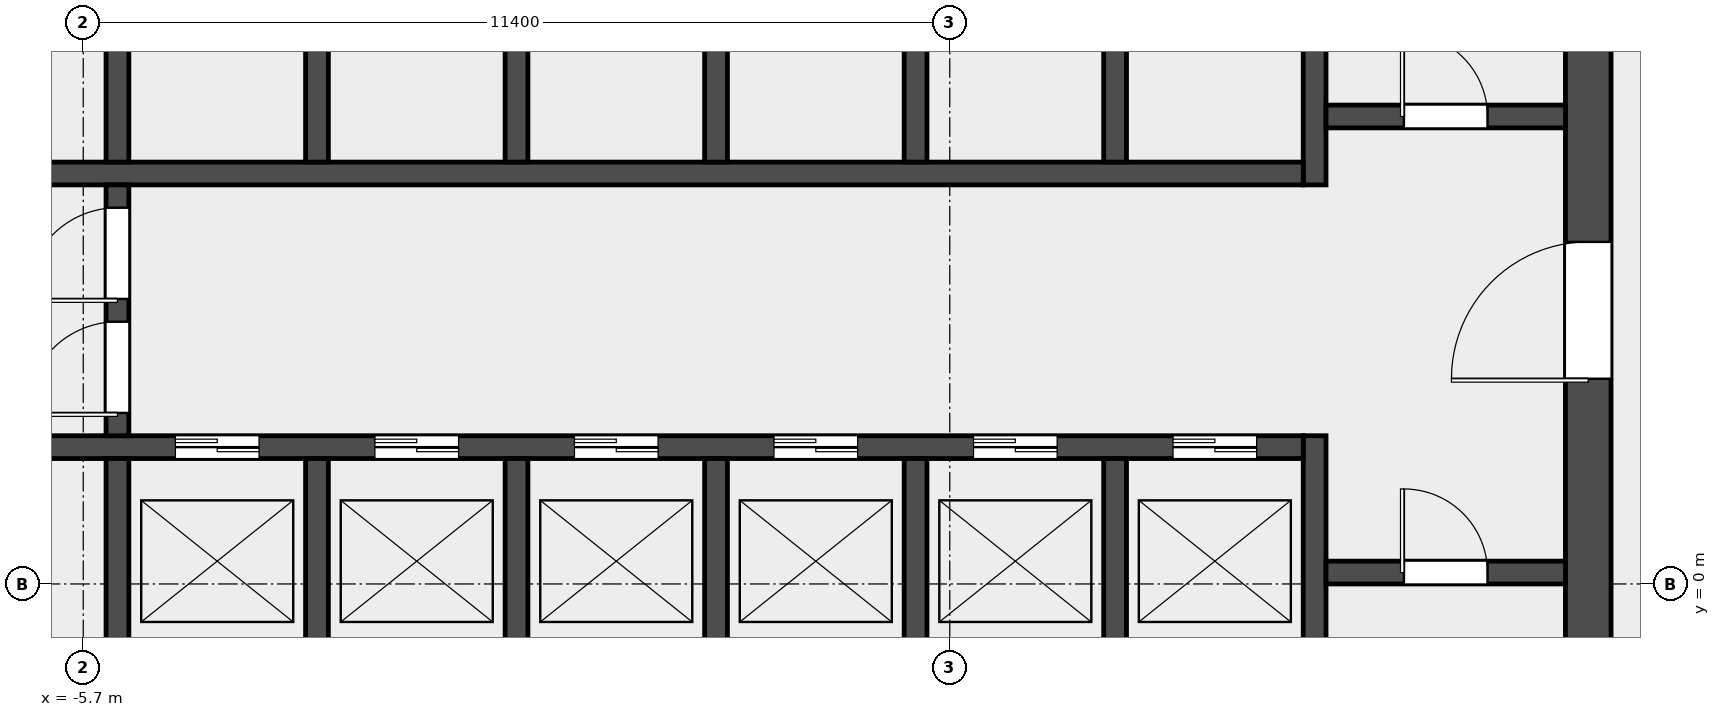
"""IFC4 building model, lengths in metres.
Left out: names, types, materials, properties, quantities, classifications, styles, units other than length and angle.
Written with IfcOpenShell. Run it as: python <this file> out.ifc"""

import sys

from ifc_helpers import new_model, si_unit, direction, frame, frame_2d, origin, place, context, subcontext, project, spatial, rectangle, extrude, element, fill, save


model = new_model("IFC4")
c1 = context("Model", 3, precision=1e-05, world=origin(), true_north=direction((0.0, 1.0)))
c2 = subcontext(c1, "Body", "Model", "MODEL_VIEW")
j1 = project(units=[si_unit("LENGTHUNIT", "METRE"), si_unit("PLANEANGLEUNIT", "RADIAN")], contexts=[c1])
p1 = place(None, origin())
s1 = spatial("IfcSite", under=j1, at=p1, CompositionType="ELEMENT")
p2 = place(p1, origin())
s2 = spatial("IfcBuilding", under=s1, at=p2, CompositionType="ELEMENT")
p3 = place(p2, frame((0.0, 0.0, 197.0)))
s3 = spatial("IfcBuildingStorey", under=s2, at=p3, CompositionType="ELEMENT", Elevation=197.0)
p4 = place(p3, frame((14.1, -6.6, 0.0), z_axis=(0.0, 0.0, 1.0), x_axis=(0.0, 1.0, 0.0)))
e1 = element("IfcWall", 1, at=p4, inside=s3, PredefinedType="SHEAR", context=c2, shape_type="SweptSolid", body=[
    extrude(rectangle(XDim=19.5, YDim=0.6, at=frame_2d((9.75, 0.0))), origin(), (0.0, 0.0, 1.0), 3.7),
])
p5 = place(p4, frame((9.3, 0.0, 0.0)))
e2 = element("IfcOpeningElement", 2, at=p5, cuts=e1, PredefinedType="OPENING", context=c2, shape_type="SweptSolid", body=[
    extrude(rectangle(XDim=1.8, YDim=2.1, at=frame_2d((0.9, 1.05))), frame((0.0, 0.312, 0.0), z_axis=(0.0, -1.0, 0.0), x_axis=(1.0, 0.0, 0.0)), (0.0, 0.0, 1.0), 0.624),
])
p6 = place(p3, frame((10.5, -6.6, 0.0), z_axis=(0.0, 0.0, 1.0), x_axis=(0.0, 1.0, 0.0)))
e3 = element("IfcWall", 3, at=p6, inside=s3, PredefinedType="SHEAR", context=c2, shape_type="SweptSolid", body=[
    extrude(rectangle(XDim=8.55, YDim=0.3, at=frame_2d((4.275, 0.0))), origin(), (0.0, 0.0, 1.0), 3.7),
])
p7 = place(p3, frame((10.5, 5.25, 0.0), z_axis=(0.0, 0.0, 1.0), x_axis=(0.0, 1.0, 0.0)))
e4 = element("IfcWall", 4, at=p7, inside=s3, PredefinedType="SHEAR", context=c2, shape_type="SweptSolid", body=[
    extrude(rectangle(XDim=7.65, YDim=0.3, at=frame_2d((3.825, 0.0))), origin(), (0.0, 0.0, 1.0), 3.7),
])
p8 = place(p3, frame((10.65, 0.15, 0.0), z_axis=(0.0, 0.0, 1.0), x_axis=(1.0, 0.0, 0.0)))
e5 = element("IfcWall", 5, at=p8, inside=s3, PredefinedType="SOLIDWALL", context=c2, shape_type="SweptSolid", body=[
    extrude(rectangle(XDim=3.15, YDim=0.3, at=frame_2d((1.575, 0.0))), origin(), (0.0, 0.0, 1.0), 3.7),
])
p9 = place(p8, frame((1.025, 0.0, 0.0)))
e6 = element("IfcOpeningElement", 6, at=p9, cuts=e5, PredefinedType="OPENING", context=c2, shape_type="SweptSolid", body=[
    extrude(rectangle(XDim=1.1, YDim=2.1, at=frame_2d((0.55, 1.05))), frame((0.0, 0.162, 0.0), z_axis=(0.0, -1.0, 0.0), x_axis=(1.0, 0.0, 0.0)), (0.0, 0.0, 1.0), 0.324),
])
p10 = place(p3, frame((10.65, 6.15, 0.0), z_axis=(0.0, 0.0, 1.0), x_axis=(1.0, 0.0, 0.0)))
e7 = element("IfcWall", 7, at=p10, inside=s3, PredefinedType="SOLIDWALL", context=c2, shape_type="SweptSolid", body=[
    extrude(rectangle(XDim=3.15, YDim=0.3, at=frame_2d((1.575, 0.0))), origin(), (0.0, 0.0, 1.0), 3.7),
])
p11 = place(p10, frame((1.025, 0.0, 0.0)))
e8 = element("IfcOpeningElement", 8, at=p11, cuts=e7, PredefinedType="OPENING", context=c2, shape_type="SweptSolid", body=[
    extrude(rectangle(XDim=1.1, YDim=2.1, at=frame_2d((0.55, 1.05))), frame((0.0, 0.162, 0.0), z_axis=(0.0, -1.0, 0.0), x_axis=(1.0, 0.0, 0.0)), (0.0, 0.0, 1.0), 0.324),
])
p12 = place(p3, frame((-10.35, 1.8, 0.0), z_axis=(0.0, 0.0, 1.0), x_axis=(1.0, 0.0, 0.0)))
e9 = element("IfcWall", 9, at=p12, inside=s3, PredefinedType="SOLIDWALL", context=c2, shape_type="SweptSolid", body=[
    extrude(rectangle(XDim=20.7, YDim=0.3, at=frame_2d((10.35, 0.0))), origin(), (0.0, 0.0, 1.0), 3.7),
])
p13 = place(p12, frame((0.512, 0.0, 0.0)))
e10 = element("IfcOpeningElement", 10, at=p13, cuts=e9, PredefinedType="OPENING", context=c2, shape_type="SweptSolid", body=[
    extrude(rectangle(XDim=1.3, YDim=2.1, at=frame_2d((0.65, 1.05))), frame((0.0, 0.162, 0.0), z_axis=(0.0, -1.0, 0.0), x_axis=(1.0, 0.0, 0.0)), (0.0, 0.0, 1.0), 0.324),
])
p14 = place(p12, frame((5.863, 0.0, 0.0)))
e11 = element("IfcOpeningElement", 11, at=p14, cuts=e9, PredefinedType="OPENING", context=c2, shape_type="SweptSolid", body=[
    extrude(rectangle(XDim=1.1, YDim=2.1, at=frame_2d((0.55, 1.05))), frame((0.0, 0.162, 0.0), z_axis=(0.0, -1.0, 0.0), x_axis=(1.0, 0.0, 0.0)), (0.0, 0.0, 1.0), 0.324),
])
p15 = place(p12, frame((8.488, 0.0, 0.0)))
e12 = element("IfcOpeningElement", 12, at=p15, cuts=e9, PredefinedType="OPENING", context=c2, shape_type="SweptSolid", body=[
    extrude(rectangle(XDim=1.1, YDim=2.1, at=frame_2d((0.55, 1.05))), frame((0.0, 0.162, 0.0), z_axis=(0.0, -1.0, 0.0), x_axis=(1.0, 0.0, 0.0)), (0.0, 0.0, 1.0), 0.324),
])
p16 = place(p12, frame((11.113, 0.0, 0.0)))
e13 = element("IfcOpeningElement", 13, at=p16, cuts=e9, PredefinedType="OPENING", context=c2, shape_type="SweptSolid", body=[
    extrude(rectangle(XDim=1.1, YDim=2.1, at=frame_2d((0.55, 1.05))), frame((0.0, 0.162, 0.0), z_axis=(0.0, -1.0, 0.0), x_axis=(1.0, 0.0, 0.0)), (0.0, 0.0, 1.0), 0.324),
])
p17 = place(p12, frame((13.738, 0.0, 0.0)))
e14 = element("IfcOpeningElement", 14, at=p17, cuts=e9, PredefinedType="OPENING", context=c2, shape_type="SweptSolid", body=[
    extrude(rectangle(XDim=1.1, YDim=2.1, at=frame_2d((0.55, 1.05))), frame((0.0, 0.162, 0.0), z_axis=(0.0, -1.0, 0.0), x_axis=(1.0, 0.0, 0.0)), (0.0, 0.0, 1.0), 0.324),
])
p18 = place(p12, frame((16.363, 0.0, 0.0)))
e15 = element("IfcOpeningElement", 15, at=p18, cuts=e9, PredefinedType="OPENING", context=c2, shape_type="SweptSolid", body=[
    extrude(rectangle(XDim=1.1, YDim=2.1, at=frame_2d((0.55, 1.05))), frame((0.0, 0.162, 0.0), z_axis=(0.0, -1.0, 0.0), x_axis=(1.0, 0.0, 0.0)), (0.0, 0.0, 1.0), 0.324),
])
p19 = place(p12, frame((18.988, 0.0, 0.0)))
e16 = element("IfcOpeningElement", 16, at=p19, cuts=e9, PredefinedType="OPENING", context=c2, shape_type="SweptSolid", body=[
    extrude(rectangle(XDim=1.1, YDim=2.1, at=frame_2d((0.55, 1.05))), frame((0.0, 0.162, 0.0), z_axis=(0.0, -1.0, 0.0), x_axis=(1.0, 0.0, 0.0)), (0.0, 0.0, 1.0), 0.324),
])
p20 = place(p3, frame((-10.35, 5.4, 0.0), z_axis=(0.0, 0.0, 1.0), x_axis=(1.0, 0.0, 0.0)))
e17 = element("IfcWall", 17, at=p20, inside=s3, PredefinedType="SOLIDWALL", context=c2, shape_type="SweptSolid", body=[
    extrude(rectangle(XDim=20.7, YDim=0.3, at=frame_2d((10.35, 0.0))), origin(), (0.0, 0.0, 1.0), 3.7),
])
p21 = place(p20, frame((0.512, 0.0, 0.0)))
e18 = element("IfcOpeningElement", 18, at=p21, cuts=e17, PredefinedType="OPENING", context=c2, shape_type="SweptSolid", body=[
    extrude(rectangle(XDim=1.3, YDim=2.1, at=frame_2d((0.65, 1.05))), frame((0.0, 0.162, 0.0), z_axis=(0.0, -1.0, 0.0), x_axis=(1.0, 0.0, 0.0)), (0.0, 0.0, 1.0), 0.324),
])
for number, where, z_axis, x_axis in (
    (19, (-5.25, -1.05, 0.0), (0.0, 0.0, 1.0), (0.0, 1.0, 0.0)),
    (20, (-2.625, -1.05, 0.0), (0.0, 0.0, 1.0), (0.0, 1.0, 0.0)),
    (21, (0.0, -1.05, 0.0), (0.0, 0.0, 1.0), (0.0, 1.0, 0.0)),
    (22, (2.625, -1.05, 0.0), (0.0, 0.0, 1.0), (0.0, 1.0, 0.0)),
    (23, (5.25, -1.05, 0.0), (0.0, 0.0, 1.0), (0.0, 1.0, 0.0)),
    (24, (7.875, -1.05, 0.0), (0.0, 0.0, 1.0), (0.0, 1.0, 0.0)),
    (25, (-5.25, 5.55, 0.0), (0.0, 0.0, 1.0), (0.0, 1.0, 0.0)),
    (26, (-2.625, 5.55, 0.0), (0.0, 0.0, 1.0), (0.0, 1.0, 0.0)),
    (27, (0.0, 5.55, 0.0), (0.0, 0.0, 1.0), (0.0, 1.0, 0.0)),
    (28, (2.625, 5.55, 0.0), (0.0, 0.0, 1.0), (0.0, 1.0, 0.0)),
    (29, (5.25, 5.55, 0.0), (0.0, 0.0, 1.0), (0.0, 1.0, 0.0)),
    (30, (7.875, 5.55, 0.0), (0.0, 0.0, 1.0), (0.0, 1.0, 0.0)),
):
    element("IfcWall", number, at=place(p3, frame(where, z_axis=z_axis, x_axis=x_axis)), inside=s3, PredefinedType="SOLIDWALL", context=c2, shape_type="SweptSolid", body=[
        extrude(rectangle(XDim=2.7, YDim=0.3, at=frame_2d((1.35, 0.0))), origin(), (0.0, 0.0, 1.0), 3.7),
    ])
p22 = place(p3, frame((-5.25, 1.95, 0.0), z_axis=(0.0, 0.0, 1.0), x_axis=(0.0, 1.0, 0.0)))
e31 = element("IfcWall", 31, at=p22, inside=s3, PredefinedType="SOLIDWALL", context=c2, shape_type="SweptSolid", body=[
    extrude(rectangle(XDim=3.3, YDim=0.3, at=frame_2d((1.65, 0.0))), origin(), (0.0, 0.0, 1.0), 3.7),
])
p23 = place(p22, frame((0.3, 0.0, 0.0)))
e32 = element("IfcOpeningElement", 32, at=p23, cuts=e31, PredefinedType="OPENING", context=c2, shape_type="SweptSolid", body=[
    extrude(rectangle(XDim=1.2, YDim=2.1, at=frame_2d((0.6, 1.05))), frame((0.0, 0.162, 0.0), z_axis=(0.0, -1.0, 0.0), x_axis=(1.0, 0.0, 0.0)), (0.0, 0.0, 1.0), 0.324),
])
p24 = place(p22, frame((1.8, 0.0, 0.0)))
e33 = element("IfcOpeningElement", 33, at=p24, cuts=e31, PredefinedType="OPENING", context=c2, shape_type="SweptSolid", body=[
    extrude(rectangle(XDim=1.2, YDim=2.1, at=frame_2d((0.6, 1.05))), frame((0.0, 0.162, 0.0), z_axis=(0.0, -1.0, 0.0), x_axis=(1.0, 0.0, 0.0)), (0.0, 0.0, 1.0), 0.324),
])
p25 = place(p9, origin())
e34 = element("IfcDoor", 34, at=p25, inside=s3, OperationType="SINGLE_SWING_RIGHT", PredefinedType="DOOR", context=c2, shape_type="SweptSolid", body=[
    extrude(rectangle(XDim=1.1, YDim=2.1, at=frame_2d((0.55, 1.05))), frame((0.0, 0.025, 0.0), z_axis=(0.0, -1.0, 0.0), x_axis=(1.0, 0.0, 0.0)), (0.0, 0.0, 1.0), 0.05),
])
fill(e6, e34)
p26 = place(p11, origin())
e35 = element("IfcDoor", 35, at=p26, inside=s3, OperationType="SINGLE_SWING_RIGHT", PredefinedType="DOOR", context=c2, shape_type="SweptSolid", body=[
    extrude(rectangle(XDim=1.1, YDim=2.1, at=frame_2d((0.55, 1.05))), frame((0.0, 0.025, 0.0), z_axis=(0.0, -1.0, 0.0), x_axis=(1.0, 0.0, 0.0)), (0.0, 0.0, 1.0), 0.05),
])
fill(e8, e35)
p27 = place(p5, origin())
e36 = element("IfcDoor", 36, at=p27, inside=s3, OperationType="DOUBLE_DOOR_SINGLE_SWING", PredefinedType="DOOR", context=c2, shape_type="SweptSolid", body=[
    extrude(rectangle(XDim=1.8, YDim=2.1, at=frame_2d((0.9, 1.05))), frame((0.0, 0.025, 0.0), z_axis=(0.0, -1.0, 0.0), x_axis=(1.0, 0.0, 0.0)), (0.0, 0.0, 1.0), 0.05),
])
fill(e2, e36)
p28 = place(p23, origin())
e37 = element("IfcDoor", 37, at=p28, inside=s3, OperationType="SINGLE_SWING_LEFT", PredefinedType="DOOR", context=c2, shape_type="SweptSolid", body=[
    extrude(rectangle(XDim=1.2, YDim=2.1, at=frame_2d((0.6, 1.05))), frame((0.0, 0.025, 0.0), z_axis=(0.0, -1.0, 0.0), x_axis=(1.0, 0.0, 0.0)), (0.0, 0.0, 1.0), 0.05),
])
fill(e32, e37)
p29 = place(p24, origin())
e38 = element("IfcDoor", 38, at=p29, inside=s3, OperationType="SINGLE_SWING_RIGHT", PredefinedType="DOOR", context=c2, shape_type="SweptSolid", body=[
    extrude(rectangle(XDim=1.2, YDim=2.1, at=frame_2d((0.6, 1.05))), frame((0.0, 0.025, 0.0), z_axis=(0.0, -1.0, 0.0), x_axis=(1.0, 0.0, 0.0)), (0.0, 0.0, 1.0), 0.05),
])
fill(e33, e38)
p30 = place(p14, origin())
e39 = element("IfcDoor", 39, at=p30, inside=s3, OperationType="DOUBLE_DOOR_SLIDING", PredefinedType="DOOR", context=c2, shape_type="SweptSolid", body=[
    extrude(rectangle(XDim=1.1, YDim=2.1, at=frame_2d((0.55, 1.05))), frame((0.0, 0.025, 0.0), z_axis=(0.0, -1.0, 0.0), x_axis=(1.0, 0.0, 0.0)), (0.0, 0.0, 1.0), 0.05),
])
fill(e11, e39)
p31 = place(p15, origin())
e40 = element("IfcDoor", 40, at=p31, inside=s3, OperationType="DOUBLE_DOOR_SLIDING", PredefinedType="DOOR", context=c2, shape_type="SweptSolid", body=[
    extrude(rectangle(XDim=1.1, YDim=2.1, at=frame_2d((0.55, 1.05))), frame((0.0, 0.025, 0.0), z_axis=(0.0, -1.0, 0.0), x_axis=(1.0, 0.0, 0.0)), (0.0, 0.0, 1.0), 0.05),
])
fill(e12, e40)
p32 = place(p16, origin())
e41 = element("IfcDoor", 41, at=p32, inside=s3, OperationType="DOUBLE_DOOR_SLIDING", PredefinedType="DOOR", context=c2, shape_type="SweptSolid", body=[
    extrude(rectangle(XDim=1.1, YDim=2.1, at=frame_2d((0.55, 1.05))), frame((0.0, 0.025, 0.0), z_axis=(0.0, -1.0, 0.0), x_axis=(1.0, 0.0, 0.0)), (0.0, 0.0, 1.0), 0.05),
])
fill(e13, e41)
p33 = place(p17, origin())
e42 = element("IfcDoor", 42, at=p33, inside=s3, OperationType="DOUBLE_DOOR_SLIDING", PredefinedType="DOOR", context=c2, shape_type="SweptSolid", body=[
    extrude(rectangle(XDim=1.1, YDim=2.1, at=frame_2d((0.55, 1.05))), frame((0.0, 0.025, 0.0), z_axis=(0.0, -1.0, 0.0), x_axis=(1.0, 0.0, 0.0)), (0.0, 0.0, 1.0), 0.05),
])
fill(e14, e42)
p34 = place(p18, origin())
e43 = element("IfcDoor", 43, at=p34, inside=s3, OperationType="DOUBLE_DOOR_SLIDING", PredefinedType="DOOR", context=c2, shape_type="SweptSolid", body=[
    extrude(rectangle(XDim=1.1, YDim=2.1, at=frame_2d((0.55, 1.05))), frame((0.0, 0.025, 0.0), z_axis=(0.0, -1.0, 0.0), x_axis=(1.0, 0.0, 0.0)), (0.0, 0.0, 1.0), 0.05),
])
fill(e15, e43)
p35 = place(p19, origin())
e44 = element("IfcDoor", 44, at=p35, inside=s3, OperationType="DOUBLE_DOOR_SLIDING", PredefinedType="DOOR", context=c2, shape_type="SweptSolid", body=[
    extrude(rectangle(XDim=1.1, YDim=2.1, at=frame_2d((0.55, 1.05))), frame((0.0, 0.025, 0.0), z_axis=(0.0, -1.0, 0.0), x_axis=(1.0, 0.0, 0.0)), (0.0, 0.0, 1.0), 0.05),
])
fill(e16, e44)
save(model, sys.argv[1])
